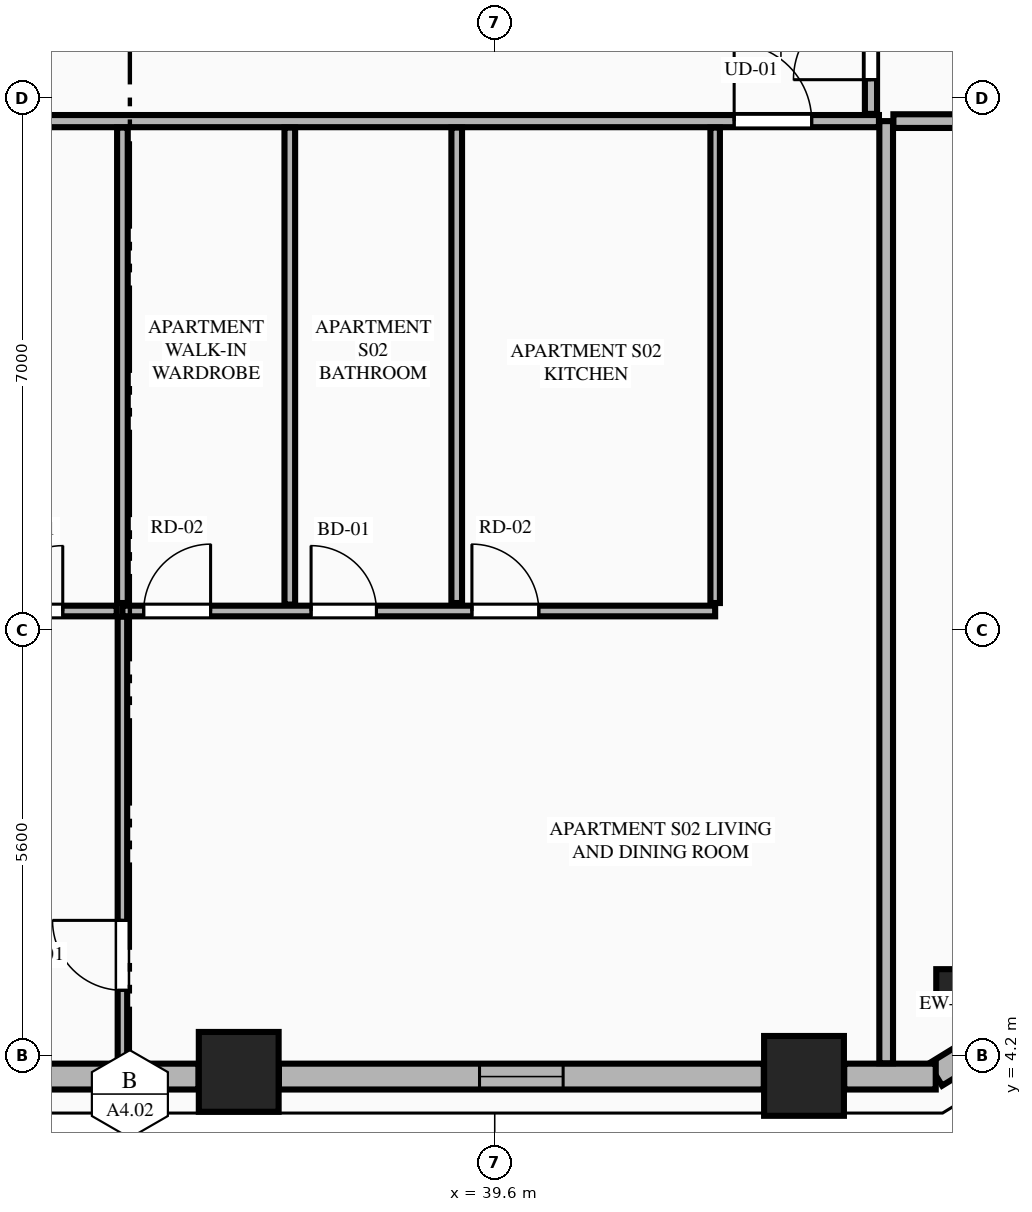
"""IFC4 building model, lengths in metres.
Left out: names, types, materials, properties, quantities, classifications, styles, units other than length and angle.
Written with IfcOpenShell. Run it as: python <this file> out.ifc"""

import sys

from ifc_helpers import new_model, si_unit, direction, frame, frame_2d, origin, origin_2d, place, context, subcontext, project, spatial, rectangle, extrude, element, fill, save


model = new_model("IFC4")
c1 = context("Model", 3, precision=1e-05, world=origin(), true_north=direction((0.0, 1.0)))
c2 = subcontext(c1, "Body", "Model", "MODEL_VIEW")
j1 = project(units=[si_unit("LENGTHUNIT", "METRE"), si_unit("PLANEANGLEUNIT", "RADIAN")], contexts=[c1])
p1 = place(None, origin())
s1 = spatial("IfcSite", under=j1, at=p1, CompositionType="ELEMENT")
p2 = place(p1, origin())
s2 = spatial("IfcBuilding", under=s1, at=p2, CompositionType="ELEMENT")
p3 = place(p2, frame((0.0, 0.0, 126.8)))
s3 = spatial("IfcBuildingStorey", under=s2, at=p3, CompositionType="ELEMENT", Elevation=126.8)
for number, where, z_axis, x_axis in (
    (1, (36.232, 3.992, 0.0), (0.0, 0.0, 1.0), (1.0, 0.0, 0.0)),
    (2, (43.669, 3.939, 0.0), (0.0, 0.0, 1.0), (1.0, 0.0, 0.0)),
):
    element("IfcColumn", number, at=place(p3, frame(where, z_axis=z_axis, x_axis=x_axis)), inside=s3, PredefinedType="COLUMN", context=c2, shape_type="SweptSolid", body=[
        extrude(rectangle(XDim=1.05, YDim=1.05, at=origin_2d()), origin(), (0.0, 0.0, 1.0), 3.55),
    ])
p4 = place(p3, frame((45.659, 5.093, 0.0), z_axis=(0.0, 0.0, 1.0), x_axis=(0.865160173452, 0.501495637342, 0.0)))
e3 = element("IfcColumn", 3, at=p4, inside=s3, PredefinedType="PILASTER", context=c2, shape_type="SweptSolid", body=[
    extrude(rectangle(XDim=0.5, YDim=0.35, at=origin_2d()), origin(), (0.0, 0.0, 1.0), 3.55),
])
p5 = place(p3, frame((45.397, 3.955, 0.0), z_axis=(0.0, 0.0, 1.0), x_axis=(0.851798915137, 0.523868884523, 0.0)))
e4 = element("IfcWall", 4, at=p5, inside=s3, PredefinedType="STANDARD", context=c2, shape_type="SweptSolid", body=[
    extrude(rectangle(XDim=1.848, YDim=0.34, at=frame_2d((0.924, 0.0))), origin(), (0.0, 0.0, 1.0), 3.34),
])
p6 = place(p3, frame((29.097, 3.93, 0.0), z_axis=(0.0, 0.0, 1.0), x_axis=(1.0, 0.0, 0.0)))
e5 = element("IfcWall", 5, at=p6, inside=s3, PredefinedType="STANDARD", context=c2, shape_type="SweptSolid", body=[
    extrude(rectangle(XDim=6.606, YDim=0.34, at=frame_2d((3.303, 0.0))), origin(), (0.0, 0.0, 1.0), 2.797),
])
p7 = place(p6, frame((2.753, 0.0, 0.75)))
e6 = element("IfcOpeningElement", 6, at=p7, cuts=e5, PredefinedType="OPENING", context=c2, shape_type="SweptSolid", body=[
    extrude(rectangle(XDim=1.1, YDim=1.897, at=frame_2d((0.55, 0.948))), frame((0.0, 0.18, 0.0), z_axis=(0.0, -1.0, 0.0), x_axis=(1.0, 0.0, 0.0)), (0.0, 0.0, 1.0), 0.36),
])
p8 = place(p3, frame((36.761, 3.93, 0.0), z_axis=(0.0, 0.0, 1.0), x_axis=(1.0, 0.0, 0.0)))
e7 = element("IfcWall", 7, at=p8, inside=s3, PredefinedType="STANDARD", context=c2, shape_type="SweptSolid", body=[
    extrude(rectangle(XDim=6.379, YDim=0.34, at=frame_2d((3.189, 0.0))), origin(), (0.0, 0.0, 1.0), 2.797),
])
p9 = place(p8, frame((2.639, 0.0, 0.75)))
e8 = element("IfcOpeningElement", 8, at=p9, cuts=e7, PredefinedType="OPENING", context=c2, shape_type="SweptSolid", body=[
    extrude(rectangle(XDim=1.1, YDim=1.897, at=frame_2d((0.55, 0.948))), frame((0.0, 0.18, 0.0), z_axis=(0.0, -1.0, 0.0), x_axis=(1.0, 0.0, 0.0)), (0.0, 0.0, 1.0), 0.36),
])
p10 = place(p3, frame((44.198, 3.93, 0.0), z_axis=(0.0, 0.0, 1.0), x_axis=(1.0, 0.0, 0.0)))
e9 = element("IfcWall", 9, at=p10, inside=s3, PredefinedType="STANDARD", context=c2, shape_type="SweptSolid", body=[
    extrude(rectangle(XDim=1.204, YDim=0.34, at=frame_2d((0.602, 0.0))), origin(), (0.0, 0.0, 1.0), 3.34),
])
p11 = place(p3, frame((44.75, 4.105, 0.0), z_axis=(0.0, 0.0, 1.0), x_axis=(0.0, 1.0, 0.0)))
e10 = element("IfcWall", 10, at=p11, inside=s3, PredefinedType="PARTITIONING", context=c2, shape_type="SweptSolid", body=[
    extrude(rectangle(XDim=12.395, YDim=0.18, at=frame_2d((6.198, 0.0))), origin(), (0.0, 0.0, 1.0), 3.34),
])
p12 = place(p3, frame((28.663, 16.5, 0.0), z_axis=(0.0, 0.0, 1.0), x_axis=(1.0, 0.0, 0.0)))
e11 = element("IfcWall", 11, at=p12, inside=s3, PredefinedType="PARTITIONING", context=c2, shape_type="SweptSolid", body=[
    extrude(rectangle(XDim=15.992, YDim=0.16, at=frame_2d((7.996, 0.0))), origin(), (0.0, 0.0, 1.0), 3.34),
])
p13 = place(p12, frame((14.087, 0.0, 0.0)))
e12 = element("IfcOpeningElement", 12, at=p13, cuts=e11, PredefinedType="OPENING", context=c2, shape_type="SweptSolid", body=[
    extrude(rectangle(XDim=1.02, YDim=2.25, at=frame_2d((0.51, 1.125))), frame((0.0, 0.09, 0.0), z_axis=(0.0, -1.0, 0.0), x_axis=(1.0, 0.0, 0.0)), (0.0, 0.0, 1.0), 0.18),
])
p14 = place(p3, frame((42.5, 10.16, 0.0), z_axis=(0.0, 0.0, 1.0), x_axis=(0.0, 1.0, 0.0)))
e13 = element("IfcWall", 13, at=p14, inside=s3, PredefinedType="PARTITIONING", context=c2, shape_type="SweptSolid", body=[
    extrude(rectangle(XDim=6.255, YDim=0.125, at=frame_2d((3.127, 0.0))), origin(), (0.0, 0.0, 1.0), 2.722),
])
p15 = place(p3, frame((34.702, 10.055, 0.0), z_axis=(0.0, 0.0, 1.0), x_axis=(1.0, 0.0, 0.0)))
e14 = element("IfcWall", 14, at=p15, inside=s3, PredefinedType="PLUMBINGWALL", context=c2, shape_type="SweptSolid", body=[
    extrude(rectangle(XDim=7.798, YDim=0.14, at=frame_2d((3.899, 0.0))), origin(), (0.0, 0.0, 1.0), 3.34),
])
p16 = place(p15, frame((0.28, 0.0, 0.0)))
e15 = element("IfcOpeningElement", 15, at=p16, cuts=e14, PredefinedType="OPENING", context=c2, shape_type="SweptSolid", body=[
    extrude(rectangle(XDim=0.88, YDim=2.15, at=frame_2d((0.44, 1.075))), frame((0.0, 0.08, 0.0), z_axis=(0.0, -1.0, 0.0), x_axis=(1.0, 0.0, 0.0)), (0.0, 0.0, 1.0), 0.16),
])
p17 = place(p15, frame((2.482, 0.0, 0.0)))
e16 = element("IfcOpeningElement", 16, at=p17, cuts=e14, PredefinedType="OPENING", context=c2, shape_type="SweptSolid", body=[
    extrude(rectangle(XDim=0.86, YDim=2.1, at=frame_2d((0.43, 1.05))), frame((0.0, 0.08, 0.0), z_axis=(0.0, -1.0, 0.0), x_axis=(1.0, 0.0, 0.0)), (0.0, 0.0, 1.0), 0.16),
])
p18 = place(p15, frame((4.598, 0.0, 0.0)))
e17 = element("IfcOpeningElement", 17, at=p18, cuts=e14, PredefinedType="OPENING", context=c2, shape_type="SweptSolid", body=[
    extrude(rectangle(XDim=0.88, YDim=2.15, at=frame_2d((0.44, 1.075))), frame((0.0, 0.08, 0.0), z_axis=(0.0, -1.0, 0.0), x_axis=(1.0, 0.0, 0.0)), (0.0, 0.0, 1.0), 0.16),
])
p19 = place(p3, frame((28.663, 10.055, 0.0), z_axis=(0.0, 0.0, 1.0), x_axis=(1.0, 0.0, 0.0)))
e18 = element("IfcWall", 18, at=p19, inside=s3, PredefinedType="PLUMBINGWALL", context=c2, shape_type="SweptSolid", body=[
    extrude(rectangle(XDim=5.964, YDim=0.14, at=frame_2d((2.982, 0.0))), origin(), (0.0, 0.0, 1.0), 3.34),
])
p20 = place(p19, frame((0.28, 0.0, 0.0)))
e19 = element("IfcOpeningElement", 19, at=p20, cuts=e18, PredefinedType="OPENING", context=c2, shape_type="SweptSolid", body=[
    extrude(rectangle(XDim=0.88, YDim=2.15, at=frame_2d((0.44, 1.075))), frame((0.0, 0.08, 0.0), z_axis=(0.0, -1.0, 0.0), x_axis=(1.0, 0.0, 0.0)), (0.0, 0.0, 1.0), 0.16),
])
p21 = place(p19, frame((4.394, 0.0, 0.0)))
e20 = element("IfcOpeningElement", 20, at=p21, cuts=e18, PredefinedType="OPENING", context=c2, shape_type="SweptSolid", body=[
    extrude(rectangle(XDim=0.86, YDim=2.1, at=frame_2d((0.43, 1.05))), frame((0.0, 0.08, 0.0), z_axis=(0.0, -1.0, 0.0), x_axis=(1.0, 0.0, 0.0)), (0.0, 0.0, 1.0), 0.16),
])
for number, where, z_axis, x_axis in (
    (21, (39.1, 10.16, 0.0), (0.0, 0.0, 1.0), (0.0, 1.0, 0.0)),
    (22, (34.702, 10.16, 0.0), (0.0, 0.0, 1.0), (0.0, 1.0, 0.0)),
):
    element("IfcWall", number, at=place(p3, frame(where, z_axis=z_axis, x_axis=x_axis)), inside=s3, PredefinedType="PLUMBINGWALL", context=c2, shape_type="SweptSolid", body=[
        extrude(rectangle(XDim=6.255, YDim=0.14, at=frame_2d((3.127, 0.0))), origin(), (0.0, 0.0, 1.0), 3.34),
    ])
p22 = place(p3, frame((34.702, 4.015, 0.0), z_axis=(0.0, 0.0, 1.0), x_axis=(0.0, 1.0, 0.0)))
e23 = element("IfcWall", 23, at=p22, inside=s3, PredefinedType="PARTITIONING", context=c2, shape_type="SweptSolid", body=[
    extrude(rectangle(XDim=5.965, YDim=0.125, at=frame_2d((2.982, 0.0))), origin(), (0.0, 0.0, 1.0), 3.34),
])
p23 = place(p22, frame((1.05, 0.0, 0.0)))
e24 = element("IfcOpeningElement", 24, at=p23, cuts=e23, PredefinedType="OPENING", context=c2, shape_type="SweptSolid", body=[
    extrude(rectangle(XDim=0.92, YDim=2.15, at=frame_2d((0.46, 1.075))), frame((0.0, 0.073, 0.0), z_axis=(0.0, -1.0, 0.0), x_axis=(1.0, 0.0, 0.0)), (0.0, 0.0, 1.0), 0.145),
])
p24 = place(p3, frame((36.904, 10.14, 0.0), z_axis=(0.0, 0.0, 1.0), x_axis=(0.0, 1.0, 0.0)))
e25 = element("IfcWall", 25, at=p24, inside=s3, PredefinedType="PLUMBINGWALL", context=c2, shape_type="SweptSolid", body=[
    extrude(rectangle(XDim=6.275, YDim=0.14, at=frame_2d((3.138, 0.0))), origin(), (0.0, 0.0, 1.0), 3.34),
])
p25 = place(p3, frame((44.845, 16.5, 0.0), z_axis=(0.0, 0.0, 1.0), x_axis=(1.0, 0.0, 0.0)))
e26 = element("IfcWall", 26, at=p25, inside=s3, PredefinedType="PARTITIONING", context=c2, shape_type="SweptSolid", body=[
    extrude(rectangle(XDim=7.77, YDim=0.18, at=frame_2d((3.885, 0.0))), origin(), (0.0, 0.0, 1.0), 3.34),
])
p26 = place(p3, frame((44.55, 16.595, 0.0), z_axis=(0.0, 0.0, 1.0), x_axis=(0.0, 1.0, 0.0)))
e27 = element("IfcWall", 27, at=p26, inside=s3, PredefinedType="PARTITIONING", context=c2, shape_type="SweptSolid", body=[
    extrude(rectangle(XDim=18.61, YDim=0.16, at=frame_2d((9.305, 0.0))), origin(), (0.0, 0.0, 1.0), 3.34),
])
p27 = place(p26, frame((0.45, 0.0, 0.0)))
e28 = element("IfcOpeningElement", 28, at=p27, cuts=e27, PredefinedType="OPENING", context=c2, shape_type="SweptSolid", body=[
    extrude(rectangle(XDim=1.02, YDim=2.25, at=frame_2d((0.51, 1.125))), frame((0.0, 0.09, 0.0), z_axis=(0.0, -1.0, 0.0), x_axis=(1.0, 0.0, 0.0)), (0.0, 0.0, 1.0), 0.18),
])
p28 = place(p9, origin())
e29 = element("IfcWindow", 29, at=p28, inside=s3, PartitioningType="SINGLE_PANEL", PredefinedType="WINDOW", context=c2, shape_type="SweptSolid", body=[
    extrude(rectangle(XDim=1.1, YDim=1.897, at=frame_2d((0.55, 0.948))), frame((0.0, 0.03, 0.0), z_axis=(0.0, -1.0, 0.0), x_axis=(1.0, 0.0, 0.0)), (0.0, 0.0, 1.0), 0.06),
])
fill(e8, e29)
p29 = place(p16, origin())
e30 = element("IfcDoor", 30, at=p29, inside=s3, OperationType="SINGLE_SWING_RIGHT", PredefinedType="DOOR", context=c2, shape_type="SweptSolid", body=[
    extrude(rectangle(XDim=0.88, YDim=2.15, at=frame_2d((0.44, 1.075))), frame((0.0, 0.025, 0.0), z_axis=(0.0, -1.0, 0.0), x_axis=(1.0, 0.0, 0.0)), (0.0, 0.0, 1.0), 0.05),
])
fill(e15, e30)
p30 = place(p17, origin())
e31 = element("IfcDoor", 31, at=p30, inside=s3, OperationType="SINGLE_SWING_LEFT", PredefinedType="DOOR", context=c2, shape_type="SweptSolid", body=[
    extrude(rectangle(XDim=0.86, YDim=2.1, at=frame_2d((0.43, 1.05))), frame((0.0, 0.025, 0.0), z_axis=(0.0, -1.0, 0.0), x_axis=(1.0, 0.0, 0.0)), (0.0, 0.0, 1.0), 0.05),
])
fill(e16, e31)
p31 = place(p21, origin())
e32 = element("IfcDoor", 32, at=p31, inside=s3, OperationType="SINGLE_SWING_RIGHT", PredefinedType="DOOR", context=c2, shape_type="SweptSolid", body=[
    extrude(rectangle(XDim=0.86, YDim=2.1, at=frame_2d((0.43, 1.05))), frame((0.0, 0.025, 0.0), z_axis=(0.0, -1.0, 0.0), x_axis=(1.0, 0.0, 0.0)), (0.0, 0.0, 1.0), 0.05),
])
fill(e20, e32)
p32 = place(p13, origin())
e33 = element("IfcDoor", 33, at=p32, inside=s3, OperationType="SINGLE_SWING_LEFT", PredefinedType="DOOR", context=c2, shape_type="SweptSolid", body=[
    extrude(rectangle(XDim=1.02, YDim=2.25, at=frame_2d((0.51, 1.125))), frame((0.0, 0.025, 0.0), z_axis=(0.0, -1.0, 0.0), x_axis=(1.0, 0.0, 0.0)), (0.0, 0.0, 1.0), 0.05),
])
fill(e12, e33)
p33 = place(p18, origin())
e34 = element("IfcDoor", 34, at=p33, inside=s3, OperationType="SINGLE_SWING_LEFT", PredefinedType="DOOR", context=c2, shape_type="SweptSolid", body=[
    extrude(rectangle(XDim=0.88, YDim=2.15, at=frame_2d((0.44, 1.075))), frame((0.0, 0.025, 0.0), z_axis=(0.0, -1.0, 0.0), x_axis=(1.0, 0.0, 0.0)), (0.0, 0.0, 1.0), 0.05),
])
fill(e17, e34)
p34 = place(p23, origin())
e35 = element("IfcDoor", 35, at=p34, inside=s3, OperationType="SINGLE_SWING_RIGHT", PredefinedType="DOOR", context=c2, shape_type="SweptSolid", body=[
    extrude(rectangle(XDim=0.92, YDim=2.15, at=frame_2d((0.46, 1.075))), frame((0.0, 0.025, 0.0), z_axis=(0.0, -1.0, 0.0), x_axis=(1.0, 0.0, 0.0)), (0.0, 0.0, 1.0), 0.05),
])
fill(e24, e35)
p35 = place(p27, origin())
e36 = element("IfcDoor", 36, at=p35, inside=s3, OperationType="SINGLE_SWING_LEFT", PredefinedType="DOOR", context=c2, shape_type="SweptSolid", body=[
    extrude(rectangle(XDim=1.02, YDim=2.25, at=frame_2d((0.51, 1.125))), frame((0.0, 0.025, 0.0), z_axis=(0.0, -1.0, 0.0), x_axis=(1.0, 0.0, 0.0)), (0.0, 0.0, 1.0), 0.05),
])
fill(e28, e36)
save(model, sys.argv[1])
